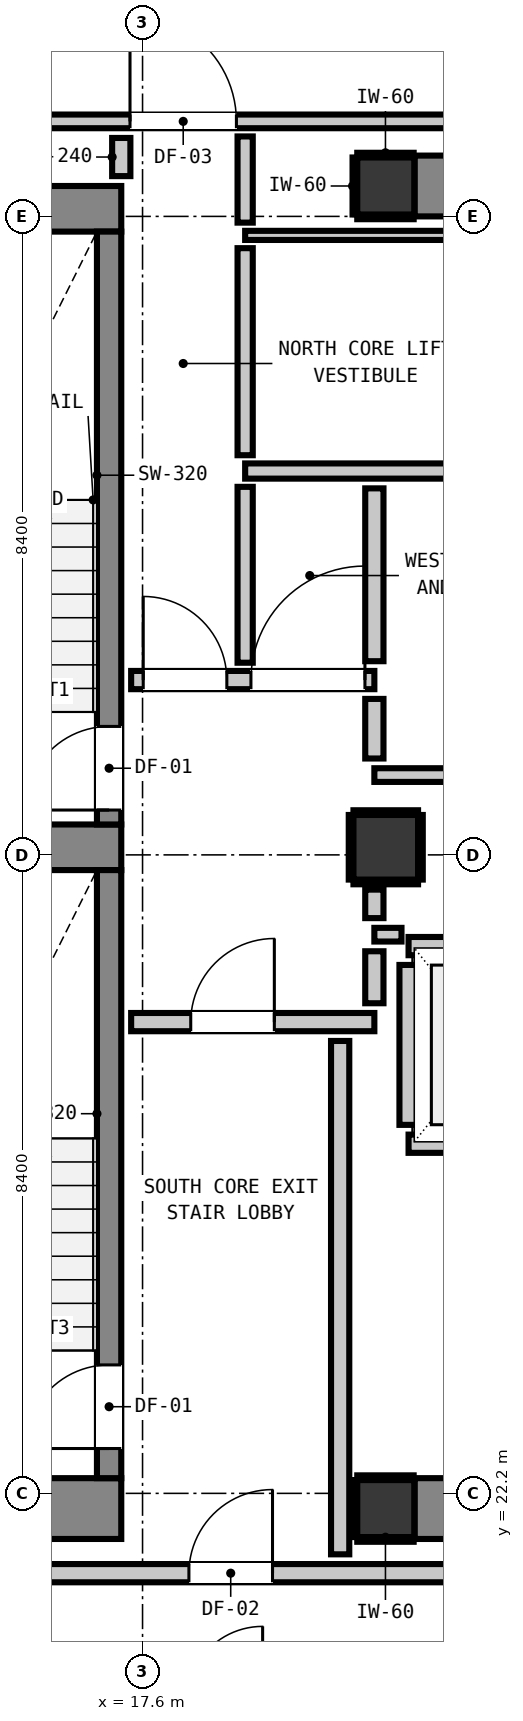
"""IFC4 building model, lengths in metres.
Left out: names, types, materials, properties, quantities, classifications, styles, units other than length and angle.
Written with IfcOpenShell. Run it as: python <this file> out.ifc"""

import sys

from ifc_helpers import new_model, si_unit, direction, frame, frame_2d, origin, origin_2d, place, context, subcontext, project, spatial, rectangle, extrude, element, fill, save


model = new_model("IFC4")
c1 = context("Model", 3, precision=1e-05, world=origin(), true_north=direction((0.0, 1.0)))
c2 = subcontext(c1, "Body", "Model", "MODEL_VIEW")
j1 = project(units=[si_unit("LENGTHUNIT", "METRE"), si_unit("PLANEANGLEUNIT", "RADIAN")], contexts=[c1])
p1 = place(None, origin())
s1 = spatial("IfcSite", under=j1, at=p1, CompositionType="ELEMENT")
p2 = place(p1, origin())
s2 = spatial("IfcBuilding", under=s1, at=p2, CompositionType="ELEMENT")
p3 = place(p2, frame((0.0, 0.0, 234.6)))
s3 = spatial("IfcBuildingStorey", under=s2, at=p3, CompositionType="ELEMENT", Elevation=234.6)
for number, where, z_axis, x_axis in (
    (1, (20.8, 22.0, 0.0), (0.0, 0.0, 1.0), (1.0, 0.0, 0.0)),
    (2, (20.8, 39.4, 0.0), (0.0, 0.0, 1.0), (1.0, 0.0, 0.0)),
):
    element("IfcColumn", number, at=place(p3, frame(where, z_axis=z_axis, x_axis=x_axis)), inside=s3, PredefinedType="COLUMN", context=c2, shape_type="SweptSolid", body=[
        extrude(rectangle(XDim=0.75, YDim=0.75, at=origin_2d()), origin(), (0.0, 0.0, 1.0), 3.32),
    ])
p4 = place(p3, frame((13.24, 22.0, 0.0), z_axis=(0.0, 0.0, 1.0), x_axis=(1.0, 0.0, 0.0)))
e3 = element("IfcWall", 3, at=p4, inside=s3, PredefinedType="SHEAR", context=c2, shape_type="SweptSolid", body=[
    extrude(rectangle(XDim=4.08, YDim=0.8, at=frame_2d((2.04, 0.0))), origin(), (0.0, 0.0, 1.0), 3.32),
])
p5 = place(p3, frame((13.24, 39.1, 0.0), z_axis=(0.0, 0.0, 1.0), x_axis=(1.0, 0.0, 0.0)))
e4 = element("IfcWall", 4, at=p5, inside=s3, PredefinedType="SHEAR", context=c2, shape_type="SweptSolid", body=[
    extrude(rectangle(XDim=4.08, YDim=0.6, at=frame_2d((2.04, 0.0))), origin(), (0.0, 0.0, 1.0), 3.32),
])
p6 = place(p3, frame((13.78, 30.7, 0.0), z_axis=(0.0, 0.0, 1.0), x_axis=(1.0, 0.0, 0.0)))
e5 = element("IfcWall", 5, at=p6, inside=s3, PredefinedType="SHEAR", context=c2, shape_type="SweptSolid", body=[
    extrude(rectangle(XDim=3.54, YDim=0.6, at=frame_2d((1.77, 0.0))), origin(), (0.0, 0.0, 1.0), 3.32),
])
for number, where, z_axis, x_axis in (
    (6, (21.18, 22.0, 0.0), (0.0, 0.0, 1.0), (1.0, 0.0, 0.0)),
    (7, (21.18, 39.4, 0.0), (0.0, 0.0, 1.0), (1.0, 0.0, 0.0)),
):
    element("IfcWall", number, at=place(p3, frame(where, z_axis=z_axis, x_axis=x_axis)), inside=s3, PredefinedType="SHEAR", context=c2, shape_type="SweptSolid", body=[
        extrude(rectangle(XDim=7.64, YDim=0.8, at=frame_2d((3.82, 0.0))), origin(), (0.0, 0.0, 1.0), 3.32),
    ])
p7 = place(p3, frame((17.16, 31.0, 0.0), z_axis=(0.0, 0.0, 1.0), x_axis=(0.0, 1.0, 0.0)))
e8 = element("IfcWall", 8, at=p7, inside=s3, PredefinedType="SHEAR", context=c2, shape_type="SweptSolid", body=[
    extrude(rectangle(XDim=7.8, YDim=0.32, at=frame_2d((3.9, 0.0))), origin(), (0.0, 0.0, 1.0), 3.32),
])
p8 = place(p7, frame((0.19, 0.0, 0.0)))
e9 = element("IfcOpeningElement", 9, at=p8, cuts=e8, PredefinedType="OPENING", context=c2, shape_type="SweptSolid", body=[
    extrude(rectangle(XDim=1.1, YDim=2.15, at=frame_2d((0.55, 1.075))), frame((0.0, 0.17, 0.0), z_axis=(0.0, -1.0, 0.0), x_axis=(1.0, 0.0, 0.0)), (0.0, 0.0, 1.0), 0.34),
])
p9 = place(p3, frame((17.16, 22.4, 0.0), z_axis=(0.0, 0.0, 1.0), x_axis=(0.0, 1.0, 0.0)))
e10 = element("IfcWall", 10, at=p9, inside=s3, PredefinedType="SHEAR", context=c2, shape_type="SweptSolid", body=[
    extrude(rectangle(XDim=8.0, YDim=0.32, at=frame_2d((4.0, 0.0))), origin(), (0.0, 0.0, 1.0), 3.32),
])
p10 = place(p9, frame((0.39, 0.0, 0.0)))
e11 = element("IfcOpeningElement", 11, at=p10, cuts=e10, PredefinedType="OPENING", context=c2, shape_type="SweptSolid", body=[
    extrude(rectangle(XDim=1.1, YDim=2.15, at=frame_2d((0.55, 1.075))), frame((0.0, 0.17, 0.0), z_axis=(0.0, -1.0, 0.0), x_axis=(1.0, 0.0, 0.0)), (0.0, 0.0, 1.0), 0.34),
])
p11 = place(p3, frame((20.8, 30.7, 0.0), z_axis=(0.0, 0.0, 1.0), x_axis=(1.0, 0.0, 0.0)))
e12 = element("IfcColumn", 12, at=p11, inside=s3, PredefinedType="COLUMN", context=c2, shape_type="SweptSolid", body=[
    extrude(rectangle(XDim=0.85, YDim=0.85, at=origin_2d()), origin(), (0.0, 0.0, 1.0), 3.32),
])
for number, where, z_axis, x_axis in (
    (13, (21.1, 26.8, 0.0), (0.0, 0.0, 1.0), (1.0, 0.0, 0.0)),
    (14, (21.1, 29.4, 0.0), (0.0, 0.0, 1.0), (1.0, 0.0, 0.0)),
):
    element("IfcWall", number, at=place(p3, frame(where, z_axis=z_axis, x_axis=x_axis)), inside=s3, PredefinedType="PARTITIONING", context=c2, shape_type="SweptSolid", body=[
        extrude(rectangle(XDim=2.2, YDim=0.24, at=frame_2d((1.1, 0.0))), origin(), (0.0, 0.0, 1.0), 3.1),
    ])
p12 = place(p3, frame((21.1, 27.048, 0.0), z_axis=(0.0, 0.0, 1.0), x_axis=(0.0, 1.0, 0.0)))
e15 = element("IfcWall", 15, at=p12, inside=s3, PredefinedType="PARTITIONING", context=c2, shape_type="SweptSolid", body=[
    extrude(rectangle(XDim=2.104, YDim=0.24, at=frame_2d((1.052, 0.0))), origin(), (0.0, 0.0, 1.0), 2.335),
])
p13 = place(p3, frame((10.787, 21.15, 0.0), z_axis=(0.0, 0.0, 1.0), x_axis=(1.0, 0.0, 0.0)))
e16 = element("IfcWall", 16, at=p13, inside=s3, PredefinedType="PARTITIONING", context=c2, shape_type="SweptSolid", body=[
    extrude(rectangle(XDim=26.102, YDim=0.24, at=frame_2d((13.051, 0.0))), origin(), (0.0, 0.0, 1.0), 3.1),
])
p14 = place(p13, frame((7.423, 0.0, 0.0)))
e17 = element("IfcOpeningElement", 17, at=p14, cuts=e16, PredefinedType="OPENING", context=c2, shape_type="SweptSolid", body=[
    extrude(rectangle(XDim=1.1, YDim=2.15, at=frame_2d((0.55, 1.075))), frame((0.0, 0.13, 0.0), z_axis=(0.0, -1.0, 0.0), x_axis=(1.0, 0.0, 0.0)), (0.0, 0.0, 1.0), 0.26),
])
p15 = place(p3, frame((17.45, 28.4, 0.0), z_axis=(0.0, 0.0, 1.0), x_axis=(1.0, 0.0, 0.0)))
e18 = element("IfcWall", 18, at=p15, inside=s3, PredefinedType="PARTITIONING", context=c2, shape_type="SweptSolid", body=[
    extrude(rectangle(XDim=3.2, YDim=0.24, at=frame_2d((1.6, 0.0))), origin(), (0.0, 0.0, 1.0), 3.1),
])
p16 = place(p15, frame((0.784, 0.0, 0.0)))
e19 = element("IfcOpeningElement", 19, at=p16, cuts=e18, PredefinedType="OPENING", context=c2, shape_type="SweptSolid", body=[
    extrude(rectangle(XDim=1.1, YDim=2.15, at=frame_2d((0.55, 1.075))), frame((0.0, 0.13, 0.0), z_axis=(0.0, -1.0, 0.0), x_axis=(1.0, 0.0, 0.0)), (0.0, 0.0, 1.0), 0.26),
])
p17 = place(p3, frame((17.45, 32.9, 0.0), z_axis=(0.0, 0.0, 1.0), x_axis=(1.0, 0.0, 0.0)))
e20 = element("IfcWall", 20, at=p17, inside=s3, PredefinedType="PARTITIONING", context=c2, shape_type="SweptSolid", body=[
    extrude(rectangle(XDim=3.2, YDim=0.24, at=frame_2d((1.6, 0.0))), origin(), (0.0, 0.0, 1.0), 3.1),
])
p18 = place(p17, frame((0.159, 0.0, 0.0)))
e21 = element("IfcOpeningElement", 21, at=p18, cuts=e20, PredefinedType="OPENING", context=c2, shape_type="SweptSolid", body=[
    extrude(rectangle(XDim=1.1, YDim=2.15, at=frame_2d((0.55, 1.075))), frame((0.0, 0.13, 0.0), z_axis=(0.0, -1.0, 0.0), x_axis=(1.0, 0.0, 0.0)), (0.0, 0.0, 1.0), 0.26),
])
p19 = place(p17, frame((1.576, 0.0, 0.0)))
e22 = element("IfcOpeningElement", 22, at=p19, cuts=e20, PredefinedType="OPENING", context=c2, shape_type="SweptSolid", body=[
    extrude(rectangle(XDim=1.5, YDim=2.15, at=frame_2d((0.75, 1.075))), frame((0.0, 0.13, 0.0), z_axis=(0.0, -1.0, 0.0), x_axis=(1.0, 0.0, 0.0)), (0.0, 0.0, 1.0), 0.26),
])
p20 = place(p3, frame((18.95, 35.65, 0.0), z_axis=(0.0, 0.0, 1.0), x_axis=(1.0, 0.0, 0.0)))
e23 = element("IfcWall", 23, at=p20, inside=s3, PredefinedType="PARTITIONING", context=c2, shape_type="SweptSolid", body=[
    extrude(rectangle(XDim=11.025, YDim=0.2, at=frame_2d((5.513, 0.0))), origin(), (0.0, 0.0, 1.0), 3.1),
])
p21 = place(p20, frame((9.749, 0.0, 0.0)))
e24 = element("IfcOpeningElement", 24, at=p21, cuts=e23, PredefinedType="OPENING", context=c2, shape_type="SweptSolid", body=[
    extrude(rectangle(XDim=0.9, YDim=2.1, at=frame_2d((0.45, 1.05))), frame((0.0, 0.11, 0.0), z_axis=(0.0, -1.0, 0.0), x_axis=(1.0, 0.0, 0.0)), (0.0, 0.0, 1.0), 0.22),
])
p22 = place(p3, frame((20.65, 29.55, 0.0), z_axis=(0.0, 0.0, 1.0), x_axis=(1.0, 0.0, 0.0)))
e25 = element("IfcWall", 25, at=p22, inside=s3, PredefinedType="PARTITIONING", context=c2, shape_type="SweptSolid", body=[
    extrude(rectangle(XDim=0.357, YDim=0.18, at=frame_2d((0.179, 0.0))), origin(), (0.0, 0.0, 1.0), 3.1),
])
p23 = place(p3, frame((20.65, 31.65, 0.0), z_axis=(0.0, 0.0, 1.0), x_axis=(1.0, 0.0, 0.0)))
e26 = element("IfcWall", 26, at=p23, inside=s3, PredefinedType="PARTITIONING", context=c2, shape_type="SweptSolid", body=[
    extrude(rectangle(XDim=7.7, YDim=0.18, at=frame_2d((3.85, 0.0))), origin(), (0.0, 0.0, 1.0), 3.1),
])
p24 = place(p23, frame((4.673, 0.0, 0.0)))
e27 = element("IfcOpeningElement", 27, at=p24, cuts=e26, PredefinedType="OPENING", context=c2, shape_type="SweptSolid", body=[
    extrude(rectangle(XDim=0.9, YDim=2.1, at=frame_2d((0.45, 1.05))), frame((0.0, 0.1, 0.0), z_axis=(0.0, -1.0, 0.0), x_axis=(1.0, 0.0, 0.0)), (0.0, 0.0, 1.0), 0.2),
])
p25 = place(p3, frame((10.787, 40.25, 0.0), z_axis=(0.0, 0.0, 1.0), x_axis=(1.0, 0.0, 0.0)))
e28 = element("IfcWall", 28, at=p25, inside=s3, PredefinedType="PARTITIONING", context=c2, shape_type="SweptSolid", body=[
    extrude(rectangle(XDim=36.626, YDim=0.18, at=frame_2d((18.313, 0.0))), origin(), (0.0, 0.0, 1.0), 3.1),
])
p26 = place(p25, frame((6.648, 0.0, 0.0)))
e29 = element("IfcOpeningElement", 29, at=p26, cuts=e28, PredefinedType="OPENING", context=c2, shape_type="SweptSolid", body=[
    extrude(rectangle(XDim=1.4, YDim=2.15, at=frame_2d((0.7, 1.075))), frame((0.0, 0.1, 0.0), z_axis=(0.0, -1.0, 0.0), x_axis=(1.0, 0.0, 0.0)), (0.0, 0.0, 1.0), 0.2),
])
p27 = place(p25, frame((29.788, 0.0, 0.0)))
e30 = element("IfcOpeningElement", 30, at=p27, cuts=e28, PredefinedType="OPENING", context=c2, shape_type="SweptSolid", body=[
    extrude(rectangle(XDim=1.0, YDim=2.15, at=frame_2d((0.5, 1.075))), frame((0.0, 0.1, 0.0), z_axis=(0.0, -1.0, 0.0), x_axis=(1.0, 0.0, 0.0)), (0.0, 0.0, 1.0), 0.2),
])
p28 = place(p3, frame((18.95, 38.75, 0.0), z_axis=(0.0, 0.0, 1.0), x_axis=(1.0, 0.0, 0.0)))
e31 = element("IfcWall", 31, at=p28, inside=s3, PredefinedType="PARTITIONING", context=c2, shape_type="SweptSolid", body=[
    extrude(rectangle(XDim=13.56, YDim=0.12, at=frame_2d((6.78, 0.0))), origin(), (0.0, 0.0, 1.0), 3.1),
])
p29 = place(p3, frame((17.32, 39.53, 0.0), z_axis=(0.0, 0.0, 1.0), x_axis=(0.0, 1.0, 0.0)))
e32 = element("IfcWall", 32, at=p29, inside=s3, PredefinedType="PARTITIONING", context=c2, shape_type="SweptSolid", body=[
    extrude(rectangle(XDim=0.502, YDim=0.24, at=frame_2d((0.251, 0.0))), origin(), (0.0, 0.0, 1.0), 3.1),
])
p30 = place(p3, frame((20.2, 21.398, 0.0), z_axis=(0.0, 0.0, 1.0), x_axis=(0.0, 1.0, 0.0)))
e33 = element("IfcWall", 33, at=p30, inside=s3, PredefinedType="PARTITIONING", context=c2, shape_type="SweptSolid", body=[
    extrude(rectangle(XDim=6.754, YDim=0.24, at=frame_2d((3.377, 0.0))), origin(), (0.0, 0.0, 1.0), 3.1),
])
p31 = place(p3, frame((20.65, 28.648, 0.0), z_axis=(0.0, 0.0, 1.0), x_axis=(0.0, 1.0, 0.0)))
e34 = element("IfcWall", 34, at=p31, inside=s3, PredefinedType="PARTITIONING", context=c2, shape_type="SweptSolid", body=[
    extrude(rectangle(XDim=0.684, YDim=0.24, at=frame_2d((0.342, 0.0))), origin(), (0.0, 0.0, 1.0), 2.335),
])
p32 = place(p3, frame((20.65, 29.768, 0.0), z_axis=(0.0, 0.0, 1.0), x_axis=(0.0, 1.0, 0.0)))
e35 = element("IfcWall", 35, at=p32, inside=s3, PredefinedType="PARTITIONING", context=c2, shape_type="SweptSolid", body=[
    extrude(rectangle(XDim=0.375, YDim=0.24, at=frame_2d((0.188, 0.0))), origin(), (0.0, 0.0, 1.0), 2.335),
])
p33 = place(p3, frame((20.65, 31.868, 0.0), z_axis=(0.0, 0.0, 1.0), x_axis=(0.0, 1.0, 0.0)))
e36 = element("IfcWall", 36, at=p33, inside=s3, PredefinedType="PARTITIONING", context=c2, shape_type="SweptSolid", body=[
    extrude(rectangle(XDim=0.784, YDim=0.24, at=frame_2d((0.392, 0.0))), origin(), (0.0, 0.0, 1.0), 2.335),
])
p34 = place(p3, frame((20.65, 33.148, 0.0), z_axis=(0.0, 0.0, 1.0), x_axis=(0.0, 1.0, 0.0)))
e37 = element("IfcWall", 37, at=p34, inside=s3, PredefinedType="PARTITIONING", context=c2, shape_type="SweptSolid", body=[
    extrude(rectangle(XDim=2.274, YDim=0.24, at=frame_2d((1.137, 0.0))), origin(), (0.0, 0.0, 1.0), 2.335),
])
p35 = place(p3, frame((18.95, 33.128, 0.0), z_axis=(0.0, 0.0, 1.0), x_axis=(0.0, 1.0, 0.0)))
e38 = element("IfcWall", 38, at=p35, inside=s3, PredefinedType="PARTITIONING", context=c2, shape_type="SweptSolid", body=[
    extrude(rectangle(XDim=2.314, YDim=0.2, at=frame_2d((1.157, 0.0))), origin(), (0.0, 0.0, 1.0), 3.1),
])
p36 = place(p3, frame((18.95, 35.858, 0.0), z_axis=(0.0, 0.0, 1.0), x_axis=(0.0, 1.0, 0.0)))
e39 = element("IfcWall", 39, at=p36, inside=s3, PredefinedType="PARTITIONING", context=c2, shape_type="SweptSolid", body=[
    extrude(rectangle(XDim=2.724, YDim=0.2, at=frame_2d((1.362, 0.0))), origin(), (0.0, 0.0, 1.0), 3.1),
])
p37 = place(p3, frame((18.95, 38.918, 0.0), z_axis=(0.0, 0.0, 1.0), x_axis=(0.0, 1.0, 0.0)))
e40 = element("IfcWall", 40, at=p37, inside=s3, PredefinedType="PARTITIONING", context=c2, shape_type="SweptSolid", body=[
    extrude(rectangle(XDim=1.134, YDim=0.2, at=frame_2d((0.567, 0.0))), origin(), (0.0, 0.0, 1.0), 3.1),
])
for number, where, z_axis, x_axis in (
    (41, (20.425, 21.593, 0.0), (0.0, 0.0, 1.0), (1.0, 0.0, 0.0)),
    (42, (20.425, 22.407, 0.0), (0.0, 0.0, 1.0), (1.0, 0.0, 0.0)),
):
    element("IfcWall", number, at=place(p3, frame(where, z_axis=z_axis, x_axis=x_axis)), inside=s3, PredefinedType="PARTITIONING", context=c2, shape_type="SweptSolid", body=[
        extrude(rectangle(XDim=0.742, YDim=0.06, at=frame_2d((0.371, 0.0))), origin(), (0.0, 0.0, 1.0), 1.45),
    ])
p38 = place(p3, frame((20.393, 21.625, 0.0), z_axis=(0.0, 0.0, 1.0), x_axis=(0.0, 1.0, 0.0)))
e43 = element("IfcWall", 43, at=p38, inside=s3, PredefinedType="PARTITIONING", context=c2, shape_type="SweptSolid", body=[
    extrude(rectangle(XDim=0.75, YDim=0.06, at=frame_2d((0.375, 0.0))), origin(), (0.0, 0.0, 1.0), 1.45),
])
for number, where, z_axis, x_axis in (
    (44, (20.425, 38.993, 0.0), (0.0, 0.0, 1.0), (1.0, 0.0, 0.0)),
    (45, (20.425, 39.807, 0.0), (0.0, 0.0, 1.0), (1.0, 0.0, 0.0)),
):
    element("IfcWall", number, at=place(p3, frame(where, z_axis=z_axis, x_axis=x_axis)), inside=s3, PredefinedType="PARTITIONING", context=c2, shape_type="SweptSolid", body=[
        extrude(rectangle(XDim=0.742, YDim=0.06, at=frame_2d((0.371, 0.0))), origin(), (0.0, 0.0, 1.0), 1.45),
    ])
p39 = place(p3, frame((20.393, 39.025, 0.0), z_axis=(0.0, 0.0, 1.0), x_axis=(0.0, 1.0, 0.0)))
e46 = element("IfcWall", 46, at=p39, inside=s3, PredefinedType="PARTITIONING", context=c2, shape_type="SweptSolid", body=[
    extrude(rectangle(XDim=0.75, YDim=0.06, at=frame_2d((0.375, 0.0))), origin(), (0.0, 0.0, 1.0), 1.45),
])
for number, where, z_axis, x_axis in (
    (47, (20.375, 30.243, 0.0), (0.0, 0.0, 1.0), (1.0, 0.0, 0.0)),
    (48, (20.375, 31.157, 0.0), (0.0, 0.0, 1.0), (1.0, 0.0, 0.0)),
    (49, (20.343, 30.275, 0.0), (0.0, 0.0, 1.0), (0.0, 1.0, 0.0)),
    (50, (21.257, 30.275, 0.0), (0.0, 0.0, 1.0), (0.0, 1.0, 0.0)),
):
    element("IfcWall", number, at=place(p3, frame(where, z_axis=z_axis, x_axis=x_axis)), inside=s3, PredefinedType="PARTITIONING", context=c2, shape_type="SweptSolid", body=[
        extrude(rectangle(XDim=0.85, YDim=0.06, at=frame_2d((0.425, 0.0))), origin(), (0.0, 0.0, 1.0), 1.45),
    ])
p40 = place(p8, origin())
e51 = element("IfcDoor", 51, at=p40, inside=s3, OperationType="SINGLE_SWING_LEFT", PredefinedType="DOOR", context=c2, shape_type="SweptSolid", body=[
    extrude(rectangle(XDim=1.1, YDim=2.15, at=frame_2d((0.55, 1.075))), frame((0.0, 0.025, 0.0), z_axis=(0.0, -1.0, 0.0), x_axis=(1.0, 0.0, 0.0)), (0.0, 0.0, 1.0), 0.05),
])
fill(e9, e51)
p41 = place(p10, origin())
e52 = element("IfcDoor", 52, at=p41, inside=s3, OperationType="SINGLE_SWING_LEFT", PredefinedType="DOOR", context=c2, shape_type="SweptSolid", body=[
    extrude(rectangle(XDim=1.1, YDim=2.15, at=frame_2d((0.55, 1.075))), frame((0.0, 0.025, 0.0), z_axis=(0.0, -1.0, 0.0), x_axis=(1.0, 0.0, 0.0)), (0.0, 0.0, 1.0), 0.05),
])
fill(e11, e52)
p42 = place(p16, origin())
e53 = element("IfcDoor", 53, at=p42, inside=s3, OperationType="SINGLE_SWING_RIGHT", PredefinedType="DOOR", context=c2, shape_type="SweptSolid", body=[
    extrude(rectangle(XDim=1.1, YDim=2.15, at=frame_2d((0.55, 1.075))), frame((0.0, 0.025, 0.0), z_axis=(0.0, -1.0, 0.0), x_axis=(1.0, 0.0, 0.0)), (0.0, 0.0, 1.0), 0.05),
])
fill(e19, e53)
p43 = place(p18, origin())
e54 = element("IfcDoor", 54, at=p43, inside=s3, OperationType="SINGLE_SWING_LEFT", PredefinedType="DOOR", context=c2, shape_type="SweptSolid", body=[
    extrude(rectangle(XDim=1.1, YDim=2.15, at=frame_2d((0.55, 1.075))), frame((0.0, 0.025, 0.0), z_axis=(0.0, -1.0, 0.0), x_axis=(1.0, 0.0, 0.0)), (0.0, 0.0, 1.0), 0.05),
])
fill(e21, e54)
p44 = place(p14, origin())
e55 = element("IfcDoor", 55, at=p44, inside=s3, OperationType="SINGLE_SWING_RIGHT", PredefinedType="DOOR", context=c2, shape_type="SweptSolid", body=[
    extrude(rectangle(XDim=1.1, YDim=2.15, at=frame_2d((0.55, 1.075))), frame((0.0, 0.025, 0.0), z_axis=(0.0, -1.0, 0.0), x_axis=(1.0, 0.0, 0.0)), (0.0, 0.0, 1.0), 0.05),
])
fill(e17, e55)
p45 = place(p26, origin())
e56 = element("IfcDoor", 56, at=p45, inside=s3, OperationType="SINGLE_SWING_LEFT", PredefinedType="DOOR", context=c2, shape_type="SweptSolid", body=[
    extrude(rectangle(XDim=1.4, YDim=2.15, at=frame_2d((0.7, 1.075))), frame((0.0, 0.025, 0.0), z_axis=(0.0, -1.0, 0.0), x_axis=(1.0, 0.0, 0.0)), (0.0, 0.0, 1.0), 0.05),
])
fill(e29, e56)
p46 = place(p19, origin())
e57 = element("IfcDoor", 57, at=p46, inside=s3, OperationType="SINGLE_SWING_RIGHT", PredefinedType="DOOR", context=c2, shape_type="SweptSolid", body=[
    extrude(rectangle(XDim=1.5, YDim=2.15, at=frame_2d((0.75, 1.075))), frame((0.0, 0.025, 0.0), z_axis=(0.0, -1.0, 0.0), x_axis=(1.0, 0.0, 0.0)), (0.0, 0.0, 1.0), 0.05),
])
fill(e22, e57)
save(model, sys.argv[1])
